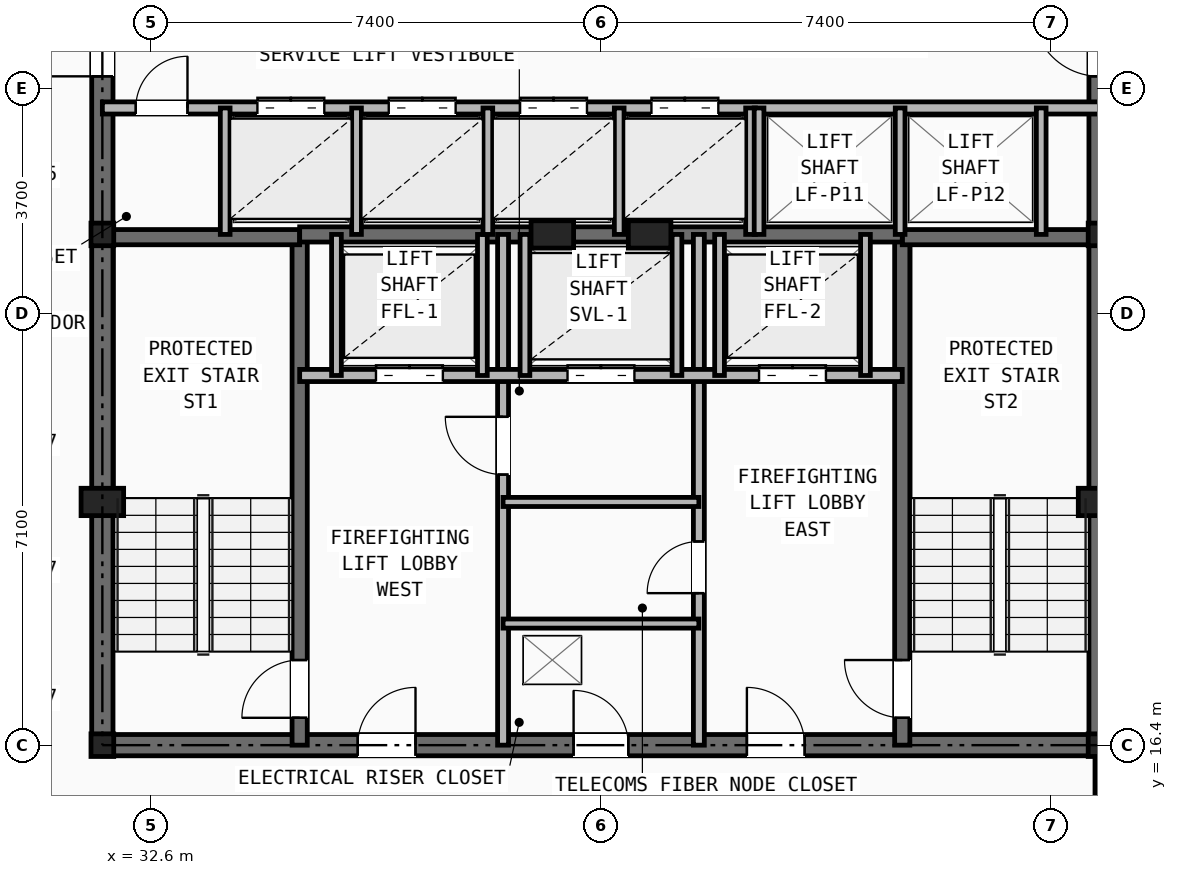
"""IFC4 building model, lengths in metres.
Left out: names, types, materials, properties, quantities, classifications, styles, units other than length and angle.
Written with IfcOpenShell. Run it as: python <this file> out.ifc"""

import sys

from ifc_helpers import new_model, si_unit, direction, frame, frame_2d, origin, origin_2d, place, context, subcontext, project, spatial, rectangle, i_section, extrude, element, fill, save


model = new_model("IFC4")
c1 = context("Model", 3, precision=1e-05, world=origin(), true_north=direction((0.0, 1.0)))
c2 = subcontext(c1, "Body", "Model", "MODEL_VIEW")
j1 = project(units=[si_unit("LENGTHUNIT", "METRE"), si_unit("PLANEANGLEUNIT", "RADIAN")], contexts=[c1])
p1 = place(None, origin())
s1 = spatial("IfcSite", under=j1, at=p1, CompositionType="ELEMENT")
p2 = place(p1, origin())
s2 = spatial("IfcBuilding", under=s1, at=p2, CompositionType="ELEMENT")
p3 = place(p2, frame((0.0, 0.0, 150.5)))
s3 = spatial("IfcBuildingStorey", under=s2, at=p3, CompositionType="ELEMENT", Elevation=150.5)
for number, where, z_axis, x_axis in (
    (1, (31.8, 16.4, 0.0), (0.0, 0.0, 1.0), (1.0, 0.0, 0.0)),
    (2, (48.2, 16.4, 0.0), (0.0, 0.0, 1.0), (1.0, 0.0, 0.0)),
    (3, (31.8, 24.8, 0.0), (0.0, 0.0, 1.0), (1.0, 0.0, 0.0)),
    (4, (48.2, 24.8, 0.0), (0.0, 0.0, 1.0), (1.0, 0.0, 0.0)),
):
    element("IfcColumn", number, at=place(p3, frame(where, z_axis=z_axis, x_axis=x_axis)), inside=s3, PredefinedType="COLUMN", context=c2, shape_type="SweptSolid", body=[
        extrude(i_section(OverallWidth=0.374, OverallDepth=0.372, WebThickness=0.016, FlangeThickness=0.026, at=origin_2d()), origin(), (0.0, 0.0, 1.0), 3.45),
    ])
for number, where, z_axis, x_axis in (
    (5, (31.8, 20.4, 0.0), (0.0, 0.0, 1.0), (1.0, 0.0, 0.0)),
    (6, (48.2, 20.4, 0.0), (0.0, 0.0, 1.0), (1.0, 0.0, 0.0)),
    (7, (39.2, 24.8, 0.0), (0.0, 0.0, 1.0), (1.0, 0.0, 0.0)),
    (8, (40.8, 24.8, 0.0), (0.0, 0.0, 1.0), (1.0, 0.0, 0.0)),
):
    element("IfcColumn", number, at=place(p3, frame(where, z_axis=z_axis, x_axis=x_axis)), inside=s3, PredefinedType="PILASTER", context=c2, shape_type="SweptSolid", body=[
        extrude(rectangle(XDim=0.7, YDim=0.45, at=origin_2d()), origin(), (0.0, 0.0, 1.0), 3.45),
    ])
p4 = place(p3, frame((31.8, 16.4, 0.0), z_axis=(0.0, 0.0, 1.0), x_axis=(1.0, 0.0, 0.0)))
e9 = element("IfcWall", 9, at=p4, inside=s3, PredefinedType="SHEAR", context=c2, shape_type="SweptSolid", body=[
    extrude(rectangle(XDim=16.4, YDim=0.35, at=frame_2d((8.2, 0.0))), origin(), (0.0, 0.0, 1.0), 3.21),
])
p5 = place(p4, frame((7.75, 0.0, 0.0)))
e10 = element("IfcOpeningElement", 10, at=p5, cuts=e9, PredefinedType="OPENING", context=c2, shape_type="SweptSolid", body=[
    extrude(rectangle(XDim=0.9, YDim=2.1, at=frame_2d((0.45, 1.05))), frame((0.0, 0.185, 0.0), z_axis=(0.0, -1.0, 0.0), x_axis=(1.0, 0.0, 0.0)), (0.0, 0.0, 1.0), 0.37),
])
p6 = place(p4, frame((4.2, 0.0, 0.0)))
e11 = element("IfcOpeningElement", 11, at=p6, cuts=e9, PredefinedType="OPENING", context=c2, shape_type="SweptSolid", body=[
    extrude(rectangle(XDim=0.95, YDim=2.1, at=frame_2d((0.475, 1.05))), frame((0.0, 0.185, 0.0), z_axis=(0.0, -1.0, 0.0), x_axis=(1.0, 0.0, 0.0)), (0.0, 0.0, 1.0), 0.37),
])
p7 = place(p4, frame((10.6, 0.0, 0.0)))
e12 = element("IfcOpeningElement", 12, at=p7, cuts=e9, PredefinedType="OPENING", context=c2, shape_type="SweptSolid", body=[
    extrude(rectangle(XDim=0.95, YDim=2.1, at=frame_2d((0.475, 1.05))), frame((0.0, 0.185, 0.0), z_axis=(0.0, -1.0, 0.0), x_axis=(1.0, 0.0, 0.0)), (0.0, 0.0, 1.0), 0.37),
])
p8 = place(p3, frame((31.8, 16.4, 0.0), z_axis=(0.0, 0.0, 1.0), x_axis=(0.0, 1.0, 0.0)))
e13 = element("IfcWall", 13, at=p8, inside=s3, PredefinedType="SHEAR", context=c2, shape_type="SweptSolid", body=[
    extrude(rectangle(XDim=14.8, YDim=0.35, at=frame_2d((7.4, 0.0))), origin(), (0.0, 0.0, 1.0), 3.21),
])
p9 = place(p8, frame((11.0, 0.0, 0.0)))
e14 = element("IfcOpeningElement", 14, at=p9, cuts=e13, PredefinedType="OPENING", context=c2, shape_type="SweptSolid", body=[
    extrude(rectangle(XDim=1.1, YDim=2.15, at=frame_2d((0.55, 1.075))), frame((0.0, 0.185, 0.0), z_axis=(0.0, -1.0, 0.0), x_axis=(1.0, 0.0, 0.0)), (0.0, 0.0, 1.0), 0.37),
])
p10 = place(p3, frame((48.2, 16.4, 0.0), z_axis=(0.0, 0.0, 1.0), x_axis=(0.0, 1.0, 0.0)))
e15 = element("IfcWall", 15, at=p10, inside=s3, PredefinedType="SHEAR", context=c2, shape_type="SweptSolid", body=[
    extrude(rectangle(XDim=14.8, YDim=0.35, at=frame_2d((7.4, 0.0))), origin(), (0.0, 0.0, 1.0), 3.21),
])
p11 = place(p10, frame((11.0, 0.0, 0.0)))
e16 = element("IfcOpeningElement", 16, at=p11, cuts=e15, PredefinedType="OPENING", context=c2, shape_type="SweptSolid", body=[
    extrude(rectangle(XDim=1.1, YDim=2.15, at=frame_2d((0.55, 1.075))), frame((0.0, 0.185, 0.0), z_axis=(0.0, -1.0, 0.0), x_axis=(1.0, 0.0, 0.0)), (0.0, 0.0, 1.0), 0.37),
])
p12 = place(p3, frame((35.045, 16.4, 0.0), z_axis=(0.0, 0.0, 1.0), x_axis=(0.0, 1.0, 0.0)))
e17 = element("IfcWall", 17, at=p12, inside=s3, PredefinedType="SHEAR", context=c2, shape_type="SweptSolid", body=[
    extrude(rectangle(XDim=8.4, YDim=0.25, at=frame_2d((4.2, 0.0))), origin(), (0.0, 0.0, 1.0), 3.21),
])
p13 = place(p12, frame((0.45, 0.0, 0.0)))
e18 = element("IfcOpeningElement", 18, at=p13, cuts=e17, PredefinedType="OPENING", context=c2, shape_type="SweptSolid", body=[
    extrude(rectangle(XDim=0.95, YDim=2.1, at=frame_2d((0.475, 1.05))), frame((0.0, 0.135, 0.0), z_axis=(0.0, -1.0, 0.0), x_axis=(1.0, 0.0, 0.0)), (0.0, 0.0, 1.0), 0.27),
])
p14 = place(p3, frame((31.8, 24.755, 0.0), z_axis=(0.0, 0.0, 1.0), x_axis=(1.0, 0.0, 0.0)))
e19 = element("IfcWall", 19, at=p14, inside=s3, PredefinedType="SHEAR", context=c2, shape_type="SweptSolid", body=[
    extrude(rectangle(XDim=3.245, YDim=0.25, at=frame_2d((1.623, 0.0))), origin(), (0.0, 0.0, 1.0), 3.21),
])
p15 = place(p3, frame((44.955, 16.4, 0.0), z_axis=(0.0, 0.0, 1.0), x_axis=(0.0, 1.0, 0.0)))
e20 = element("IfcWall", 20, at=p15, inside=s3, PredefinedType="SHEAR", context=c2, shape_type="SweptSolid", body=[
    extrude(rectangle(XDim=8.4, YDim=0.25, at=frame_2d((4.2, 0.0))), origin(), (0.0, 0.0, 1.0), 3.21),
])
p16 = place(p15, frame((0.45, 0.0, 0.0)))
e21 = element("IfcOpeningElement", 21, at=p16, cuts=e20, PredefinedType="OPENING", context=c2, shape_type="SweptSolid", body=[
    extrude(rectangle(XDim=0.95, YDim=2.1, at=frame_2d((0.475, 1.05))), frame((0.0, 0.135, 0.0), z_axis=(0.0, -1.0, 0.0), x_axis=(1.0, 0.0, 0.0)), (0.0, 0.0, 1.0), 0.27),
])
p17 = place(p3, frame((44.955, 24.755, 0.0), z_axis=(0.0, 0.0, 1.0), x_axis=(1.0, 0.0, 0.0)))
e22 = element("IfcWall", 22, at=p17, inside=s3, PredefinedType="SHEAR", context=c2, shape_type="SweptSolid", body=[
    extrude(rectangle(XDim=3.245, YDim=0.25, at=frame_2d((1.623, 0.0))), origin(), (0.0, 0.0, 1.0), 3.21),
])
p18 = place(p3, frame((35.045, 24.8, 0.0), z_axis=(0.0, 0.0, 1.0), x_axis=(1.0, 0.0, 0.0)))
e23 = element("IfcWall", 23, at=p18, inside=s3, PredefinedType="SHEAR", context=c2, shape_type="SweptSolid", body=[
    extrude(rectangle(XDim=9.91, YDim=0.25, at=frame_2d((4.955, 0.0))), origin(), (0.0, 0.0, 1.0), 3.21),
])
p19 = place(p3, frame((38.39, 16.4, 0.0), z_axis=(0.0, 0.0, 1.0), x_axis=(0.0, 1.0, 0.0)))
e24 = element("IfcWall", 24, at=p19, inside=s3, PredefinedType="PARTITIONING", context=c2, shape_type="SweptSolid", body=[
    extrude(rectangle(XDim=8.4, YDim=0.18, at=frame_2d((4.2, 0.0))), origin(), (0.0, 0.0, 1.0), 2.661),
])
p20 = place(p19, frame((4.45, 0.0, 0.0)))
e25 = element("IfcOpeningElement", 25, at=p20, cuts=e24, PredefinedType="OPENING", context=c2, shape_type="SweptSolid", body=[
    extrude(rectangle(XDim=0.95, YDim=2.1, at=frame_2d((0.475, 1.05))), frame((0.0, 0.1, 0.0), z_axis=(0.0, -1.0, 0.0), x_axis=(1.0, 0.0, 0.0)), (0.0, 0.0, 1.0), 0.2),
])
p21 = place(p3, frame((41.61, 16.4, 0.0), z_axis=(0.0, 0.0, 1.0), x_axis=(0.0, 1.0, 0.0)))
e26 = element("IfcWall", 26, at=p21, inside=s3, PredefinedType="PARTITIONING", context=c2, shape_type="SweptSolid", body=[
    extrude(rectangle(XDim=8.4, YDim=0.18, at=frame_2d((4.2, 0.0))), origin(), (0.0, 0.0, 1.0), 2.661),
])
p22 = place(p21, frame((2.5, 0.0, 0.0)))
e27 = element("IfcOpeningElement", 27, at=p22, cuts=e26, PredefinedType="OPENING", context=c2, shape_type="SweptSolid", body=[
    extrude(rectangle(XDim=0.85, YDim=2.05, at=frame_2d((0.425, 1.025))), frame((0.0, 0.1, 0.0), z_axis=(0.0, -1.0, 0.0), x_axis=(1.0, 0.0, 0.0)), (0.0, 0.0, 1.0), 0.2),
])
p23 = place(p3, frame((35.045, 22.48, 0.0), z_axis=(0.0, 0.0, 1.0), x_axis=(1.0, 0.0, 0.0)))
e28 = element("IfcWall", 28, at=p23, inside=s3, PredefinedType="SOLIDWALL", context=c2, shape_type="SweptSolid", body=[
    extrude(rectangle(XDim=9.91, YDim=0.2, at=frame_2d((4.955, 0.0))), origin(), (0.0, 0.0, 1.0), 3.21),
])
p24 = place(p23, frame((1.255, 0.0, 0.0)))
e29 = element("IfcOpeningElement", 29, at=p24, cuts=e28, PredefinedType="OPENING", context=c2, shape_type="SweptSolid", body=[
    extrude(rectangle(XDim=1.1, YDim=2.15, at=frame_2d((0.55, 1.075))), frame((0.0, 0.11, 0.0), z_axis=(0.0, -1.0, 0.0), x_axis=(1.0, 0.0, 0.0)), (0.0, 0.0, 1.0), 0.22),
])
p25 = place(p23, frame((7.555, 0.0, 0.0)))
e30 = element("IfcOpeningElement", 30, at=p25, cuts=e28, PredefinedType="OPENING", context=c2, shape_type="SweptSolid", body=[
    extrude(rectangle(XDim=1.1, YDim=2.15, at=frame_2d((0.55, 1.075))), frame((0.0, 0.11, 0.0), z_axis=(0.0, -1.0, 0.0), x_axis=(1.0, 0.0, 0.0)), (0.0, 0.0, 1.0), 0.22),
])
p26 = place(p23, frame((4.405, 0.0, 0.0)))
e31 = element("IfcOpeningElement", 31, at=p26, cuts=e28, PredefinedType="OPENING", context=c2, shape_type="SweptSolid", body=[
    extrude(rectangle(XDim=1.1, YDim=2.15, at=frame_2d((0.55, 1.075))), frame((0.0, 0.11, 0.0), z_axis=(0.0, -1.0, 0.0), x_axis=(1.0, 0.0, 0.0)), (0.0, 0.0, 1.0), 0.22),
])
for number, where, z_axis, x_axis in (
    (32, (38.39, 18.4, 0.0), (0.0, 0.0, 1.0), (1.0, 0.0, 0.0)),
    (33, (38.39, 20.4, 0.0), (0.0, 0.0, 1.0), (1.0, 0.0, 0.0)),
):
    element("IfcWall", number, at=place(p3, frame(where, z_axis=z_axis, x_axis=x_axis)), inside=s3, PredefinedType="PARTITIONING", context=c2, shape_type="SweptSolid", body=[
        extrude(rectangle(XDim=3.22, YDim=0.15, at=frame_2d((1.61, 0.0))), origin(), (0.0, 0.0, 1.0), 3.21),
    ])
for number, where, z_axis, x_axis in (
    (34, (35.65, 22.48, 0.0), (0.0, 0.0, 1.0), (0.0, 1.0, 0.0)),
    (35, (38.05, 22.48, 0.0), (0.0, 0.0, 1.0), (0.0, 1.0, 0.0)),
    (36, (41.95, 22.48, 0.0), (0.0, 0.0, 1.0), (0.0, 1.0, 0.0)),
    (37, (44.35, 22.48, 0.0), (0.0, 0.0, 1.0), (0.0, 1.0, 0.0)),
    (38, (38.75, 22.48, 0.0), (0.0, 0.0, 1.0), (0.0, 1.0, 0.0)),
    (39, (41.25, 22.48, 0.0), (0.0, 0.0, 1.0), (0.0, 1.0, 0.0)),
):
    element("IfcWall", number, at=place(p3, frame(where, z_axis=z_axis, x_axis=x_axis)), inside=s3, PredefinedType="SOLIDWALL", context=c2, shape_type="SweptSolid", body=[
        extrude(rectangle(XDim=2.32, YDim=0.16, at=frame_2d((1.16, 0.0))), origin(), (0.0, 0.0, 1.0), 3.21),
    ])
p27 = place(p3, frame((31.8, 26.88, 0.0), z_axis=(0.0, 0.0, 1.0), x_axis=(1.0, 0.0, 0.0)))
e40 = element("IfcWall", 40, at=p27, inside=s3, PredefinedType="SOLIDWALL", context=c2, shape_type="SweptSolid", body=[
    extrude(rectangle(XDim=16.4, YDim=0.2, at=frame_2d((8.2, 0.0))), origin(), (0.0, 0.0, 1.0), 2.661),
])
p28 = place(p27, frame((0.55, 0.0, 0.0)))
e41 = element("IfcOpeningElement", 41, at=p28, cuts=e40, PredefinedType="OPENING", context=c2, shape_type="SweptSolid", body=[
    extrude(rectangle(XDim=0.85, YDim=2.05, at=frame_2d((0.425, 1.025))), frame((0.0, 0.11, 0.0), z_axis=(0.0, -1.0, 0.0), x_axis=(1.0, 0.0, 0.0)), (0.0, 0.0, 1.0), 0.22),
])
p29 = place(p27, frame((2.55, 0.0, 0.0)))
e42 = element("IfcOpeningElement", 42, at=p29, cuts=e40, PredefinedType="OPENING", context=c2, shape_type="SweptSolid", body=[
    extrude(rectangle(XDim=1.1, YDim=2.15, at=frame_2d((0.55, 1.075))), frame((0.0, 0.11, 0.0), z_axis=(0.0, -1.0, 0.0), x_axis=(1.0, 0.0, 0.0)), (0.0, 0.0, 1.0), 0.22),
])
p30 = place(p27, frame((4.71, 0.0, 0.0)))
e43 = element("IfcOpeningElement", 43, at=p30, cuts=e40, PredefinedType="OPENING", context=c2, shape_type="SweptSolid", body=[
    extrude(rectangle(XDim=1.1, YDim=2.15, at=frame_2d((0.55, 1.075))), frame((0.0, 0.11, 0.0), z_axis=(0.0, -1.0, 0.0), x_axis=(1.0, 0.0, 0.0)), (0.0, 0.0, 1.0), 0.22),
])
p31 = place(p27, frame((6.87, 0.0, 0.0)))
e44 = element("IfcOpeningElement", 44, at=p31, cuts=e40, PredefinedType="OPENING", context=c2, shape_type="SweptSolid", body=[
    extrude(rectangle(XDim=1.1, YDim=2.15, at=frame_2d((0.55, 1.075))), frame((0.0, 0.11, 0.0), z_axis=(0.0, -1.0, 0.0), x_axis=(1.0, 0.0, 0.0)), (0.0, 0.0, 1.0), 0.22),
])
p32 = place(p27, frame((9.03, 0.0, 0.0)))
e45 = element("IfcOpeningElement", 45, at=p32, cuts=e40, PredefinedType="OPENING", context=c2, shape_type="SweptSolid", body=[
    extrude(rectangle(XDim=1.1, YDim=2.15, at=frame_2d((0.55, 1.075))), frame((0.0, 0.11, 0.0), z_axis=(0.0, -1.0, 0.0), x_axis=(1.0, 0.0, 0.0)), (0.0, 0.0, 1.0), 0.22),
])
for number, where, z_axis, x_axis in (
    (46, (33.82, 24.8, 0.0), (0.0, 0.0, 1.0), (0.0, 1.0, 0.0)),
    (47, (35.98, 24.8, 0.0), (0.0, 0.0, 1.0), (0.0, 1.0, 0.0)),
    (48, (38.14, 24.8, 0.0), (0.0, 0.0, 1.0), (0.0, 1.0, 0.0)),
    (49, (40.3, 24.8, 0.0), (0.0, 0.0, 1.0), (0.0, 1.0, 0.0)),
    (50, (42.46, 24.8, 0.0), (0.0, 0.0, 1.0), (0.0, 1.0, 0.0)),
    (51, (42.6, 24.8, 0.0), (0.0, 0.0, 1.0), (0.0, 1.0, 0.0)),
    (52, (44.92, 24.8, 0.0), (0.0, 0.0, 1.0), (0.0, 1.0, 0.0)),
    (53, (47.24, 24.8, 0.0), (0.0, 0.0, 1.0), (0.0, 1.0, 0.0)),
):
    element("IfcWall", number, at=place(p3, frame(where, z_axis=z_axis, x_axis=x_axis)), inside=s3, PredefinedType="SOLIDWALL", context=c2, shape_type="SweptSolid", body=[
        extrude(rectangle(XDim=2.08, YDim=0.16, at=frame_2d((1.04, 0.0))), origin(), (0.0, 0.0, 1.0), 3.21),
    ])
p33 = place(p3, frame((48.2, 14.1, 0.0), z_axis=(0.0, 0.0, 1.0), x_axis=(0.0, 1.0, 0.0)))
e54 = element("IfcWall", 54, at=p33, inside=s3, PredefinedType="PARTITIONING", context=c2, shape_type="SweptSolid", body=[
    extrude(rectangle(XDim=2.3, YDim=0.15, at=frame_2d((1.15, 0.0))), origin(), (0.0, 0.0, 1.0), 2.661),
])
p34 = place(p5, origin())
e55 = element("IfcDoor", 55, at=p34, inside=s3, OperationType="SINGLE_SWING_LEFT", PredefinedType="DOOR", context=c2, shape_type="SweptSolid", body=[
    extrude(rectangle(XDim=0.9, YDim=2.1, at=frame_2d((0.45, 1.05))), frame((0.0, 0.025, 0.0), z_axis=(0.0, -1.0, 0.0), x_axis=(1.0, 0.0, 0.0)), (0.0, 0.0, 1.0), 0.05),
])
fill(e10, e55)
p35 = place(p22, origin())
e56 = element("IfcDoor", 56, at=p35, inside=s3, OperationType="SINGLE_SWING_LEFT", PredefinedType="DOOR", context=c2, shape_type="SweptSolid", body=[
    extrude(rectangle(XDim=0.85, YDim=2.05, at=frame_2d((0.425, 1.025))), frame((0.0, 0.025, 0.0), z_axis=(0.0, -1.0, 0.0), x_axis=(1.0, 0.0, 0.0)), (0.0, 0.0, 1.0), 0.05),
])
fill(e27, e56)
p36 = place(p20, origin())
e57 = element("IfcDoor", 57, at=p36, inside=s3, OperationType="SINGLE_SWING_RIGHT", PredefinedType="DOOR", context=c2, shape_type="SweptSolid", body=[
    extrude(rectangle(XDim=0.95, YDim=2.1, at=frame_2d((0.475, 1.05))), frame((0.0, 0.025, 0.0), z_axis=(0.0, -1.0, 0.0), x_axis=(1.0, 0.0, 0.0)), (0.0, 0.0, 1.0), 0.05),
])
fill(e25, e57)
p37 = place(p13, origin())
e58 = element("IfcDoor", 58, at=p37, inside=s3, OperationType="SINGLE_SWING_LEFT", PredefinedType="DOOR", context=c2, shape_type="SweptSolid", body=[
    extrude(rectangle(XDim=0.95, YDim=2.1, at=frame_2d((0.475, 1.05))), frame((0.0, 0.025, 0.0), z_axis=(0.0, -1.0, 0.0), x_axis=(1.0, 0.0, 0.0)), (0.0, 0.0, 1.0), 0.05),
])
fill(e18, e58)
p38 = place(p16, origin())
e59 = element("IfcDoor", 59, at=p38, inside=s3, OperationType="SINGLE_SWING_RIGHT", PredefinedType="DOOR", context=c2, shape_type="SweptSolid", body=[
    extrude(rectangle(XDim=0.95, YDim=2.1, at=frame_2d((0.475, 1.05))), frame((0.0, 0.025, 0.0), z_axis=(0.0, -1.0, 0.0), x_axis=(1.0, 0.0, 0.0)), (0.0, 0.0, 1.0), 0.05),
])
fill(e21, e59)
p39 = place(p6, origin())
e60 = element("IfcDoor", 60, at=p39, inside=s3, OperationType="SINGLE_SWING_RIGHT", PredefinedType="DOOR", context=c2, shape_type="SweptSolid", body=[
    extrude(rectangle(XDim=0.95, YDim=2.1, at=frame_2d((0.475, 1.05))), frame((0.0, 0.025, 0.0), z_axis=(0.0, -1.0, 0.0), x_axis=(1.0, 0.0, 0.0)), (0.0, 0.0, 1.0), 0.05),
])
fill(e11, e60)
p40 = place(p7, origin())
e61 = element("IfcDoor", 61, at=p40, inside=s3, OperationType="SINGLE_SWING_LEFT", PredefinedType="DOOR", context=c2, shape_type="SweptSolid", body=[
    extrude(rectangle(XDim=0.95, YDim=2.1, at=frame_2d((0.475, 1.05))), frame((0.0, 0.025, 0.0), z_axis=(0.0, -1.0, 0.0), x_axis=(1.0, 0.0, 0.0)), (0.0, 0.0, 1.0), 0.05),
])
fill(e12, e61)
p41 = place(p24, origin())
e62 = element("IfcDoor", 62, at=p41, inside=s3, OperationType="DOUBLE_DOOR_SLIDING", PredefinedType="DOOR", context=c2, shape_type="SweptSolid", body=[
    extrude(rectangle(XDim=1.1, YDim=2.15, at=frame_2d((0.55, 1.075))), frame((0.0, 0.025, 0.0), z_axis=(0.0, -1.0, 0.0), x_axis=(1.0, 0.0, 0.0)), (0.0, 0.0, 1.0), 0.05),
])
fill(e29, e62)
p42 = place(p25, origin())
e63 = element("IfcDoor", 63, at=p42, inside=s3, OperationType="DOUBLE_DOOR_SLIDING", PredefinedType="DOOR", context=c2, shape_type="SweptSolid", body=[
    extrude(rectangle(XDim=1.1, YDim=2.15, at=frame_2d((0.55, 1.075))), frame((0.0, 0.025, 0.0), z_axis=(0.0, -1.0, 0.0), x_axis=(1.0, 0.0, 0.0)), (0.0, 0.0, 1.0), 0.05),
])
fill(e30, e63)
p43 = place(p26, origin())
e64 = element("IfcDoor", 64, at=p43, inside=s3, OperationType="DOUBLE_DOOR_SLIDING", PredefinedType="DOOR", context=c2, shape_type="SweptSolid", body=[
    extrude(rectangle(XDim=1.1, YDim=2.15, at=frame_2d((0.55, 1.075))), frame((0.0, 0.025, 0.0), z_axis=(0.0, -1.0, 0.0), x_axis=(1.0, 0.0, 0.0)), (0.0, 0.0, 1.0), 0.05),
])
fill(e31, e64)
p44 = place(p28, origin())
e65 = element("IfcDoor", 65, at=p44, inside=s3, OperationType="SINGLE_SWING_RIGHT", PredefinedType="DOOR", context=c2, shape_type="SweptSolid", body=[
    extrude(rectangle(XDim=0.85, YDim=2.05, at=frame_2d((0.425, 1.025))), frame((0.0, 0.025, 0.0), z_axis=(0.0, -1.0, 0.0), x_axis=(1.0, 0.0, 0.0)), (0.0, 0.0, 1.0), 0.05),
])
fill(e41, e65)
p45 = place(p9, origin())
e66 = element("IfcDoor", 66, at=p45, inside=s3, OperationType="SINGLE_SWING_LEFT", PredefinedType="DOOR", context=c2, shape_type="SweptSolid", body=[
    extrude(rectangle(XDim=1.1, YDim=2.15, at=frame_2d((0.55, 1.075))), frame((0.0, 0.025, 0.0), z_axis=(0.0, -1.0, 0.0), x_axis=(1.0, 0.0, 0.0)), (0.0, 0.0, 1.0), 0.05),
])
fill(e14, e66)
p46 = place(p29, origin())
e67 = element("IfcDoor", 67, at=p46, inside=s3, OperationType="DOUBLE_DOOR_SLIDING", PredefinedType="DOOR", context=c2, shape_type="SweptSolid", body=[
    extrude(rectangle(XDim=1.1, YDim=2.15, at=frame_2d((0.55, 1.075))), frame((0.0, 0.025, 0.0), z_axis=(0.0, -1.0, 0.0), x_axis=(1.0, 0.0, 0.0)), (0.0, 0.0, 1.0), 0.05),
])
fill(e42, e67)
p47 = place(p30, origin())
e68 = element("IfcDoor", 68, at=p47, inside=s3, OperationType="DOUBLE_DOOR_SLIDING", PredefinedType="DOOR", context=c2, shape_type="SweptSolid", body=[
    extrude(rectangle(XDim=1.1, YDim=2.15, at=frame_2d((0.55, 1.075))), frame((0.0, 0.025, 0.0), z_axis=(0.0, -1.0, 0.0), x_axis=(1.0, 0.0, 0.0)), (0.0, 0.0, 1.0), 0.05),
])
fill(e43, e68)
p48 = place(p31, origin())
e69 = element("IfcDoor", 69, at=p48, inside=s3, OperationType="DOUBLE_DOOR_SLIDING", PredefinedType="DOOR", context=c2, shape_type="SweptSolid", body=[
    extrude(rectangle(XDim=1.1, YDim=2.15, at=frame_2d((0.55, 1.075))), frame((0.0, 0.025, 0.0), z_axis=(0.0, -1.0, 0.0), x_axis=(1.0, 0.0, 0.0)), (0.0, 0.0, 1.0), 0.05),
])
fill(e44, e69)
p49 = place(p32, origin())
e70 = element("IfcDoor", 70, at=p49, inside=s3, OperationType="DOUBLE_DOOR_SLIDING", PredefinedType="DOOR", context=c2, shape_type="SweptSolid", body=[
    extrude(rectangle(XDim=1.1, YDim=2.15, at=frame_2d((0.55, 1.075))), frame((0.0, 0.025, 0.0), z_axis=(0.0, -1.0, 0.0), x_axis=(1.0, 0.0, 0.0)), (0.0, 0.0, 1.0), 0.05),
])
fill(e45, e70)
save(model, sys.argv[1])
